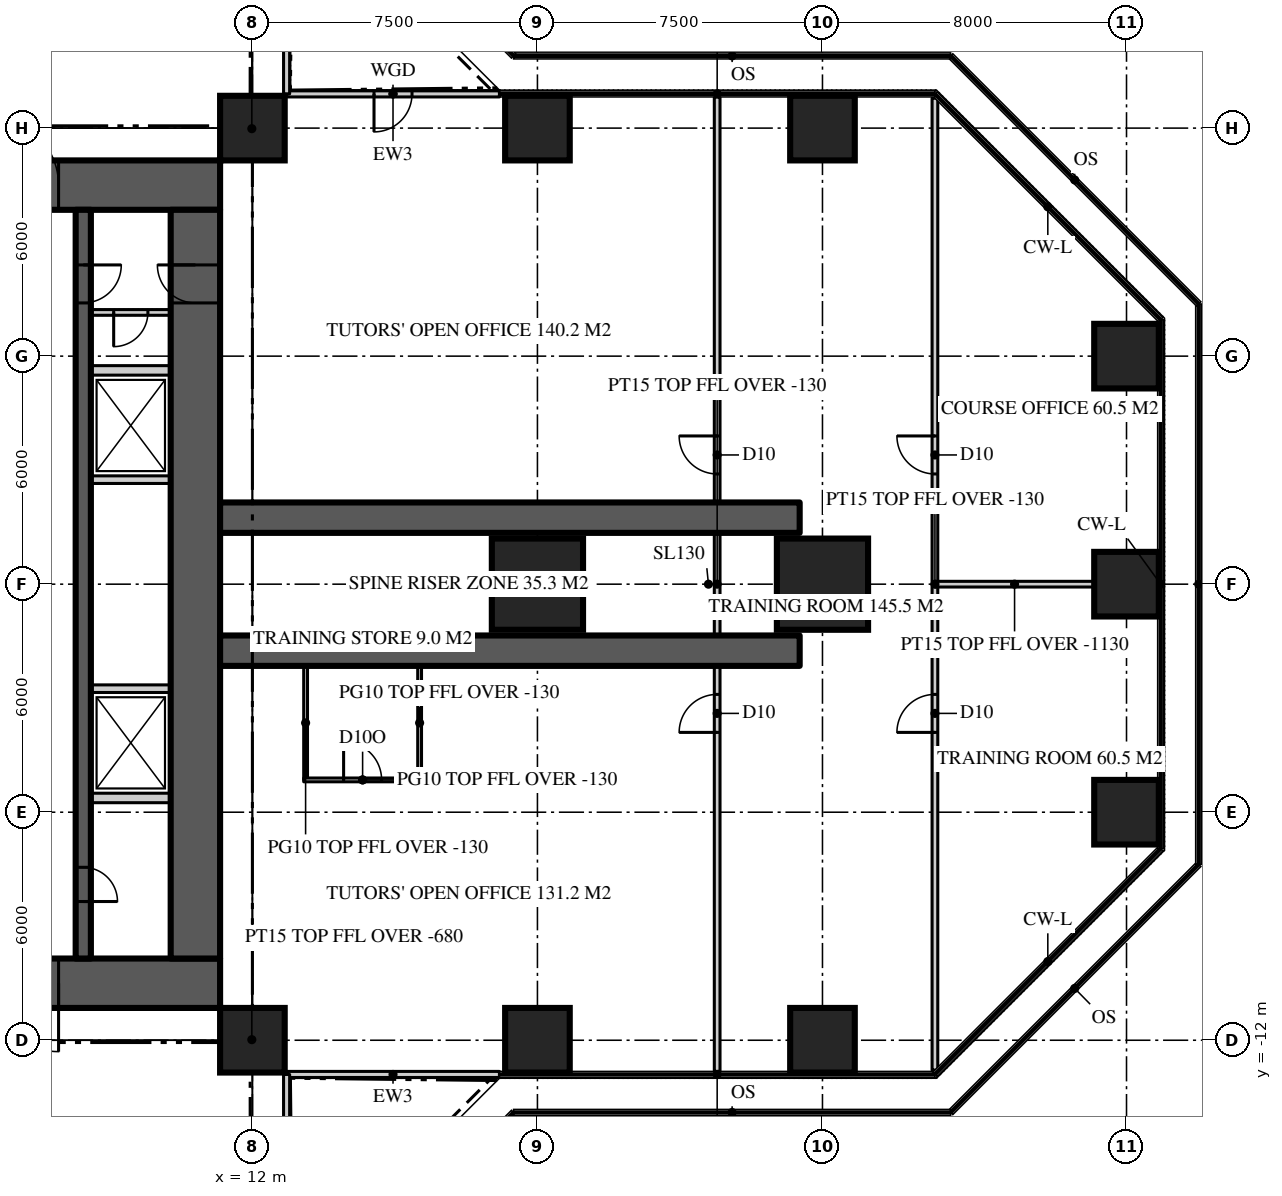
"""IFC4 building model, lengths in metres.
Left out: names, types, materials, properties, quantities, classifications, styles, units other than length and angle.
Written with IfcOpenShell. Run it as: python <this file> out.ifc"""

import sys

from ifc_helpers import new_model, si_unit, direction, frame, frame_2d, origin, origin_2d, place, context, subcontext, project, spatial, rectangle, extrude, element, fill, save


model = new_model("IFC4")
c1 = context("Model", 3, precision=1e-05, world=origin(), true_north=direction((0.0, 1.0)))
c2 = subcontext(c1, "Body", "Model", "MODEL_VIEW")
j1 = project(units=[si_unit("LENGTHUNIT", "METRE"), si_unit("PLANEANGLEUNIT", "RADIAN")], contexts=[c1])
p1 = place(None, origin())
s1 = spatial("IfcSite", under=j1, at=p1, CompositionType="ELEMENT")
p2 = place(p1, origin())
s2 = spatial("IfcBuilding", under=s1, at=p2, CompositionType="ELEMENT")
p3 = place(p2, frame((0.0, 0.0, 102.0)))
s3 = spatial("IfcBuildingStorey", under=s2, at=p3, CompositionType="ELEMENT", Elevation=102.0)
p4 = place(p3, frame((-11.15, 10.5, 0.0), z_axis=(0.0, 0.0, 1.0), x_axis=(1.0, 0.0, 0.0)))
e1 = element("IfcWall", 1, at=p4, inside=s3, PredefinedType="SHEAR", context=c2, shape_type="SweptSolid", body=[
    extrude(rectangle(XDim=22.3, YDim=1.3, at=frame_2d((11.15, 0.0))), origin(), (0.0, 0.0, 1.0), 3.9),
])
p5 = place(p4, frame((4.25, 0.0, 0.0)))
e2 = element("IfcOpeningElement", 2, at=p5, cuts=e1, PredefinedType="OPENING", context=c2, shape_type="SweptSolid", body=[
    extrude(rectangle(XDim=1.8, YDim=2.2, at=frame_2d((0.9, 1.1))), frame((0.0, 0.66, 0.0), z_axis=(0.0, -1.0, 0.0), x_axis=(1.0, 0.0, 0.0)), (0.0, 0.0, 1.0), 1.32),
])
p6 = place(p4, frame((16.25, 0.0, 0.0)))
e3 = element("IfcOpeningElement", 3, at=p6, cuts=e1, PredefinedType="OPENING", context=c2, shape_type="SweptSolid", body=[
    extrude(rectangle(XDim=1.8, YDim=2.2, at=frame_2d((0.9, 1.1))), frame((0.0, 0.66, 0.0), z_axis=(0.0, -1.0, 0.0), x_axis=(1.0, 0.0, 0.0)), (0.0, 0.0, 1.0), 1.32),
])
p7 = place(p3, frame((11.15, -10.5, 0.0), z_axis=(0.0, 0.0, 1.0), x_axis=(-1.0, 0.0, 0.0)))
e4 = element("IfcWall", 4, at=p7, inside=s3, PredefinedType="SHEAR", context=c2, shape_type="SweptSolid", body=[
    extrude(rectangle(XDim=22.3, YDim=1.3, at=frame_2d((11.15, 0.0))), origin(), (0.0, 0.0, 1.0), 3.9),
])
p8 = place(p7, frame((16.25, 0.0, 0.0)))
e5 = element("IfcOpeningElement", 5, at=p8, cuts=e4, PredefinedType="OPENING", context=c2, shape_type="SweptSolid", body=[
    extrude(rectangle(XDim=1.8, YDim=2.2, at=frame_2d((0.9, 1.1))), frame((0.0, 0.66, 0.0), z_axis=(0.0, -1.0, 0.0), x_axis=(1.0, 0.0, 0.0)), (0.0, 0.0, 1.0), 1.32),
])
p9 = place(p7, frame((4.25, 0.0, 0.0)))
e6 = element("IfcOpeningElement", 6, at=p9, cuts=e4, PredefinedType="OPENING", context=c2, shape_type="SweptSolid", body=[
    extrude(rectangle(XDim=1.8, YDim=2.2, at=frame_2d((0.9, 1.1))), frame((0.0, 0.66, 0.0), z_axis=(0.0, -1.0, 0.0), x_axis=(1.0, 0.0, 0.0)), (0.0, 0.0, 1.0), 1.32),
])
p10 = place(p3, frame((10.5, -9.85, 0.0), z_axis=(0.0, 0.0, 1.0), x_axis=(0.0, 1.0, 0.0)))
e7 = element("IfcWall", 7, at=p10, inside=s3, PredefinedType="SHEAR", context=c2, shape_type="SweptSolid", body=[
    extrude(rectangle(XDim=19.7, YDim=1.3, at=frame_2d((9.85, 0.0))), origin(), (0.0, 0.0, 1.0), 3.9),
])
p11 = place(p10, frame((17.25, 0.0, 0.0)))
e8 = element("IfcOpeningElement", 8, at=p11, cuts=e7, PredefinedType="OPENING", context=c2, shape_type="SweptSolid", body=[
    extrude(rectangle(XDim=1.0, YDim=2.2, at=frame_2d((0.5, 1.1))), frame((0.0, 0.66, 0.0), z_axis=(0.0, -1.0, 0.0), x_axis=(1.0, 0.0, 0.0)), (0.0, 0.0, 1.0), 1.32),
])
for number, where, z_axis, x_axis in (
    (9, (11.15, -1.75, 0.0), (0.0, 0.0, 1.0), (1.0, 0.0, 0.0)),
    (10, (11.15, 1.75, 0.0), (0.0, 0.0, 1.0), (1.0, 0.0, 0.0)),
):
    element("IfcWall", number, at=place(p3, frame(where, z_axis=z_axis, x_axis=x_axis)), inside=s3, PredefinedType="SHEAR", context=c2, shape_type="SweptSolid", body=[
        extrude(rectangle(XDim=15.25, YDim=0.8, at=frame_2d((7.625, 0.0))), origin(), (0.0, 0.0, 1.0), 3.9),
    ])
for number, where, z_axis, x_axis in (
    (11, (12.0, -12.0, 0.0), (0.0, 0.0, 1.0), (1.0, 0.0, 0.0)),
    (12, (19.5, -12.0, 0.0), (0.0, 0.0, 1.0), (1.0, 0.0, 0.0)),
    (13, (27.0, -12.0, 0.0), (0.0, 0.0, 1.0), (1.0, 0.0, 0.0)),
    (14, (35.0, -6.0, 0.0), (0.0, 0.0, 1.0), (1.0, 0.0, 0.0)),
):
    element("IfcColumn", number, at=place(p3, frame(where, z_axis=z_axis, x_axis=x_axis)), inside=s3, PredefinedType="COLUMN", context=c2, shape_type="SweptSolid", body=[
        extrude(rectangle(XDim=1.7, YDim=1.7, at=origin_2d()), origin(), (0.0, 0.0, 1.0), 3.9),
    ])
for number, where, z_axis, x_axis in (
    (15, (19.5, 0.0, 0.0), (0.0, 0.0, 1.0), (1.0, 0.0, 0.0)),
    (16, (27.0, 0.0, 0.0), (0.0, 0.0, 1.0), (1.0, 0.0, 0.0)),
):
    element("IfcColumn", number, at=place(p3, frame(where, z_axis=z_axis, x_axis=x_axis)), inside=s3, PredefinedType="COLUMN", context=c2, shape_type="SweptSolid", body=[
        extrude(rectangle(XDim=2.4, YDim=2.4, at=origin_2d()), origin(), (0.0, 0.0, 1.0), 3.9),
    ])
for number, where, z_axis, x_axis in (
    (17, (35.0, 0.0, 0.0), (0.0, 0.0, 1.0), (1.0, 0.0, 0.0)),
    (18, (35.0, 6.0, 0.0), (0.0, 0.0, 1.0), (1.0, 0.0, 0.0)),
    (19, (12.0, 12.0, 0.0), (0.0, 0.0, 1.0), (1.0, 0.0, 0.0)),
    (20, (19.5, 12.0, 0.0), (0.0, 0.0, 1.0), (1.0, 0.0, 0.0)),
    (21, (27.0, 12.0, 0.0), (0.0, 0.0, 1.0), (1.0, 0.0, 0.0)),
):
    element("IfcColumn", number, at=place(p3, frame(where, z_axis=z_axis, x_axis=x_axis)), inside=s3, PredefinedType="COLUMN", context=c2, shape_type="SweptSolid", body=[
        extrude(rectangle(XDim=1.7, YDim=1.7, at=origin_2d()), origin(), (0.0, 0.0, 1.0), 3.9),
    ])
p12 = place(p3, frame((12.9, -12.9, 0.0), z_axis=(0.0, 0.0, 1.0), x_axis=(1.0, 0.0, 0.0)))
e22 = element("IfcWall", 22, at=p12, inside=s3, PredefinedType="SOLIDWALL", context=c2, shape_type="SweptSolid", body=[
    extrude(rectangle(XDim=5.6, YDim=0.16, at=frame_2d((2.8, 0.0))), origin(), (0.0, 0.0, 1.0), 3.77),
])
p13 = place(p3, frame((18.5, 12.9, 0.0), z_axis=(0.0, 0.0, 1.0), x_axis=(-1.0, 0.0, 0.0)))
e23 = element("IfcWall", 23, at=p13, inside=s3, PredefinedType="SOLIDWALL", context=c2, shape_type="SweptSolid", body=[
    extrude(rectangle(XDim=5.6, YDim=0.16, at=frame_2d((2.8, 0.0))), origin(), (0.0, 0.0, 1.0), 3.77),
])
p14 = place(p13, frame((2.3, 0.0, 0.0)))
e24 = element("IfcOpeningElement", 24, at=p14, cuts=e23, PredefinedType="OPENING", context=c2, shape_type="SweptSolid", body=[
    extrude(rectangle(XDim=1.0, YDim=2.2, at=frame_2d((0.5, 1.1))), frame((0.0, 0.09, 0.0), z_axis=(0.0, -1.0, 0.0), x_axis=(1.0, 0.0, 0.0)), (0.0, 0.0, 1.0), 0.18),
])
p15 = place(p3, frame((12.9, 12.9, 0.0), z_axis=(0.0, 0.0, 1.0), x_axis=(0.0, 1.0, 0.0)))
e25 = element("IfcWall", 25, at=p15, inside=s3, PredefinedType="SOLIDWALL", context=c2, shape_type="SweptSolid", body=[
    extrude(rectangle(XDim=5.6, YDim=0.16, at=frame_2d((2.8, 0.0))), origin(), (0.0, 0.0, 1.0), 3.77),
])
p16 = place(p3, frame((12.9, -18.5, 0.0), z_axis=(0.0, 0.0, 1.0), x_axis=(0.0, 1.0, 0.0)))
e26 = element("IfcWall", 26, at=p16, inside=s3, PredefinedType="SOLIDWALL", context=c2, shape_type="SweptSolid", body=[
    extrude(rectangle(XDim=5.6, YDim=0.16, at=frame_2d((2.8, 0.0))), origin(), (0.0, 0.0, 1.0), 3.77),
])
p17 = place(p16, frame((2.3, 0.0, 0.0)))
e27 = element("IfcOpeningElement", 27, at=p17, cuts=e26, PredefinedType="OPENING", context=c2, shape_type="SweptSolid", body=[
    extrude(rectangle(XDim=1.0, YDim=2.2, at=frame_2d((0.5, 1.1))), frame((0.0, 0.09, 0.0), z_axis=(0.0, -1.0, 0.0), x_axis=(1.0, 0.0, 0.0)), (0.0, 0.0, 1.0), 0.18),
])
p18 = place(p3, frame((7.55, 9.85, 0.0), z_axis=(0.0, 0.0, 1.0), x_axis=(0.0, -1.0, 0.0)))
e28 = element("IfcWall", 28, at=p18, inside=s3, PredefinedType="SHEAR", context=c2, shape_type="SweptSolid", body=[
    extrude(rectangle(XDim=19.7, YDim=0.4, at=frame_2d((9.85, 0.0))), origin(), (0.0, 0.0, 1.0), 3.9),
])
p19 = place(p18, frame((1.45, 0.0, 0.0)))
e29 = element("IfcOpeningElement", 29, at=p19, cuts=e28, PredefinedType="OPENING", context=c2, shape_type="SweptSolid", body=[
    extrude(rectangle(XDim=1.0, YDim=2.2, at=frame_2d((0.5, 1.1))), frame((0.0, 0.21, 0.0), z_axis=(0.0, -1.0, 0.0), x_axis=(1.0, 0.0, 0.0)), (0.0, 0.0, 1.0), 0.42),
])
p20 = place(p18, frame((17.3, 0.0, 0.0)))
e30 = element("IfcOpeningElement", 30, at=p20, cuts=e28, PredefinedType="OPENING", context=c2, shape_type="SweptSolid", body=[
    extrude(rectangle(XDim=0.9, YDim=2.1, at=frame_2d((0.45, 1.05))), frame((0.0, 0.21, 0.0), z_axis=(0.0, -1.0, 0.0), x_axis=(1.0, 0.0, 0.0)), (0.0, 0.0, 1.0), 0.42),
])
for number, where, z_axis, x_axis in (
    (31, (7.75, 5.625, 0.0), (0.0, 0.0, 1.0), (1.0, 0.0, 0.0)),
    (32, (7.75, -5.625, 0.0), (0.0, 0.0, 1.0), (1.0, 0.0, 0.0)),
):
    element("IfcWall", number, at=place(p3, frame(where, z_axis=z_axis, x_axis=x_axis)), inside=s3, PredefinedType="SOLIDWALL", context=c2, shape_type="SweptSolid", body=[
        extrude(rectangle(XDim=2.1, YDim=0.25, at=frame_2d((1.05, 0.0))), origin(), (0.0, 0.0, 1.0), 3.7),
    ])
for number, where, z_axis, x_axis in (
    (33, (7.75, -2.75, 0.0), (0.0, 0.0, 1.0), (1.0, 0.0, 0.0)),
    (34, (7.75, 2.75, 0.0), (0.0, 0.0, 1.0), (1.0, 0.0, 0.0)),
):
    element("IfcWall", number, at=place(p3, frame(where, z_axis=z_axis, x_axis=x_axis)), inside=s3, PredefinedType="SOLIDWALL", context=c2, shape_type="SweptSolid", body=[
        extrude(rectangle(XDim=2.1, YDim=0.2, at=frame_2d((1.05, 0.0))), origin(), (0.0, 0.0, 1.0), 3.7),
    ])
p21 = place(p3, frame((24.229, -12.82, 0.0), z_axis=(0.0, 0.0, 1.0), x_axis=(0.0, 1.0, 0.0)))
e35 = element("IfcWall", 35, at=p21, inside=s3, PredefinedType="PARTITIONING", context=c2, shape_type="SweptSolid", body=[
    extrude(rectangle(XDim=25.64, YDim=0.15, at=frame_2d((12.82, 0.0))), origin(), (0.0, 0.0, 1.0), 3.77),
])
p22 = place(p21, frame((15.72, 0.0, 0.0)))
e36 = element("IfcOpeningElement", 36, at=p22, cuts=e35, PredefinedType="OPENING", context=c2, shape_type="SweptSolid", body=[
    extrude(rectangle(XDim=1.0, YDim=2.2, at=frame_2d((0.5, 1.1))), frame((0.0, 0.085, 0.0), z_axis=(0.0, -1.0, 0.0), x_axis=(1.0, 0.0, 0.0)), (0.0, 0.0, 1.0), 0.17),
])
p23 = place(p21, frame((8.92, 0.0, 0.0)))
e37 = element("IfcOpeningElement", 37, at=p23, cuts=e35, PredefinedType="OPENING", context=c2, shape_type="SweptSolid", body=[
    extrude(rectangle(XDim=1.0, YDim=2.2, at=frame_2d((0.5, 1.1))), frame((0.0, 0.085, 0.0), z_axis=(0.0, -1.0, 0.0), x_axis=(1.0, 0.0, 0.0)), (0.0, 0.0, 1.0), 0.17),
])
p24 = place(p3, frame((29.959, -12.786, 0.0), z_axis=(0.0, 0.0, 1.0), x_axis=(0.0, 1.0, 0.0)))
e38 = element("IfcWall", 38, at=p24, inside=s3, PredefinedType="PARTITIONING", context=c2, shape_type="SweptSolid", body=[
    extrude(rectangle(XDim=25.573, YDim=0.15, at=frame_2d((12.786, 0.0))), origin(), (0.0, 0.0, 1.0), 3.77),
])
p25 = place(p24, frame((15.687, 0.0, 0.0)))
e39 = element("IfcOpeningElement", 39, at=p25, cuts=e38, PredefinedType="OPENING", context=c2, shape_type="SweptSolid", body=[
    extrude(rectangle(XDim=1.0, YDim=2.2, at=frame_2d((0.5, 1.1))), frame((0.0, 0.085, 0.0), z_axis=(0.0, -1.0, 0.0), x_axis=(1.0, 0.0, 0.0)), (0.0, 0.0, 1.0), 0.17),
])
p26 = place(p24, frame((8.886, 0.0, 0.0)))
e40 = element("IfcOpeningElement", 40, at=p26, cuts=e38, PredefinedType="OPENING", context=c2, shape_type="SweptSolid", body=[
    extrude(rectangle(XDim=1.0, YDim=2.2, at=frame_2d((0.5, 1.1))), frame((0.0, 0.085, 0.0), z_axis=(0.0, -1.0, 0.0), x_axis=(1.0, 0.0, 0.0)), (0.0, 0.0, 1.0), 0.17),
])
p27 = place(p3, frame((29.959, 0.0, 0.0), z_axis=(0.0, 0.0, 1.0), x_axis=(1.0, 0.0, 0.0)))
e41 = element("IfcWall", 41, at=p27, inside=s3, PredefinedType="PARTITIONING", context=c2, shape_type="SweptSolid", body=[
    extrude(rectangle(XDim=4.191, YDim=0.15, at=frame_2d((2.095, 0.0))), origin(), (0.0, 0.0, 1.0), 2.77),
])
for number, where, z_axis, x_axis in (
    (42, (13.4, -2.15, 0.0), (0.0, 0.0, 1.0), (0.0, -1.0, 0.0)),
    (43, (16.4, -2.15, 0.0), (0.0, 0.0, 1.0), (0.0, -1.0, 0.0)),
):
    element("IfcWall", number, at=place(p3, frame(where, z_axis=z_axis, x_axis=x_axis)), inside=s3, PredefinedType="PARTITIONING", context=c2, shape_type="SweptSolid", body=[
        extrude(rectangle(XDim=3.0, YDim=0.1, at=frame_2d((1.5, 0.0))), origin(), (0.0, 0.0, 1.0), 3.77),
    ])
p28 = place(p3, frame((13.35, -5.15, 0.0), z_axis=(0.0, 0.0, 1.0), x_axis=(1.0, 0.0, 0.0)))
e44 = element("IfcWall", 44, at=p28, inside=s3, PredefinedType="PARTITIONING", context=c2, shape_type="SweptSolid", body=[
    extrude(rectangle(XDim=3.1, YDim=0.1, at=frame_2d((1.55, 0.0))), origin(), (0.0, 0.0, 1.0), 3.77),
])
p29 = place(p28, frame((1.05, 0.0, 0.0)))
e45 = element("IfcOpeningElement", 45, at=p29, cuts=e44, PredefinedType="OPENING", context=c2, shape_type="SweptSolid", body=[
    extrude(rectangle(XDim=1.0, YDim=2.2, at=frame_2d((0.5, 1.1))), frame((0.0, 0.06, 0.0), z_axis=(0.0, -1.0, 0.0), x_axis=(1.0, 0.0, 0.0)), (0.0, 0.0, 1.0), 0.12),
])
for number, where, z_axis, x_axis in (
    (46, (11.15, 11.15, 0.0), (0.0, 0.0, 1.0), (0.707, 0.707, 0.0)),
    (47, (11.15, -11.15, 0.0), (0.0, 0.0, 1.0), (0.707, -0.707, 0.0)),
):
    element("IfcWall", number, at=place(p3, frame(where, z_axis=z_axis, x_axis=x_axis)), inside=s3, PredefinedType="PARTITIONING", context=c2, shape_type="SweptSolid", body=[
        extrude(rectangle(XDim=2.362, YDim=0.15, at=frame_2d((1.181, 0.0))), origin(), (0.0, 0.0, 1.0), 3.22),
    ])
p30 = place(p3, frame((9.85, 7.15, 0.0), z_axis=(0.0, 0.0, 1.0), x_axis=(-1.0, 0.0, 0.0)))
e48 = element("IfcWall", 48, at=p30, inside=s3, PredefinedType="SOLIDWALL", context=c2, shape_type="SweptSolid", body=[
    extrude(rectangle(XDim=2.1, YDim=0.15, at=frame_2d((1.05, 0.0))), origin(), (0.0, 0.0, 1.0), 3.77),
])
p31 = place(p30, frame((0.6, 0.0, 0.0)))
e49 = element("IfcOpeningElement", 49, at=p31, cuts=e48, PredefinedType="OPENING", context=c2, shape_type="SweptSolid", body=[
    extrude(rectangle(XDim=0.9, YDim=2.1, at=frame_2d((0.45, 1.05))), frame((0.0, 0.085, 0.0), z_axis=(0.0, -1.0, 0.0), x_axis=(1.0, 0.0, 0.0)), (0.0, 0.0, 1.0), 0.17),
])
p32 = place(p14, origin())
e50 = element("IfcDoor", 50, at=p32, inside=s3, OperationType="SINGLE_SWING_RIGHT", PredefinedType="DOOR", context=c2, shape_type="SweptSolid", body=[
    extrude(rectangle(XDim=1.0, YDim=2.2, at=frame_2d((0.5, 1.1))), frame((0.0, 0.025, 0.0), z_axis=(0.0, -1.0, 0.0), x_axis=(1.0, 0.0, 0.0)), (0.0, 0.0, 1.0), 0.05),
])
fill(e24, e50)
p33 = place(p6, origin())
e51 = element("IfcDoor", 51, at=p33, inside=s3, OperationType="DOUBLE_DOOR_DOUBLE_SWING", PredefinedType="DOOR", context=c2, shape_type="SweptSolid", body=[
    extrude(rectangle(XDim=1.8, YDim=2.2, at=frame_2d((0.9, 1.1))), frame((0.0, 0.025, 0.0), z_axis=(0.0, -1.0, 0.0), x_axis=(1.0, 0.0, 0.0)), (0.0, 0.0, 1.0), 0.05),
])
fill(e3, e51)
p34 = place(p9, origin())
e52 = element("IfcDoor", 52, at=p34, inside=s3, OperationType="DOUBLE_DOOR_DOUBLE_SWING", PredefinedType="DOOR", context=c2, shape_type="SweptSolid", body=[
    extrude(rectangle(XDim=1.8, YDim=2.2, at=frame_2d((0.9, 1.1))), frame((0.0, 0.025, 0.0), z_axis=(0.0, -1.0, 0.0), x_axis=(1.0, 0.0, 0.0)), (0.0, 0.0, 1.0), 0.05),
])
fill(e6, e52)
p35 = place(p19, origin())
e53 = element("IfcDoor", 53, at=p35, inside=s3, OperationType="SINGLE_SWING_LEFT", PredefinedType="DOOR", context=c2, shape_type="SweptSolid", body=[
    extrude(rectangle(XDim=1.0, YDim=2.2, at=frame_2d((0.5, 1.1))), frame((0.0, 0.025, 0.0), z_axis=(0.0, -1.0, 0.0), x_axis=(1.0, 0.0, 0.0)), (0.0, 0.0, 1.0), 0.05),
])
fill(e29, e53)
p36 = place(p11, origin())
e54 = element("IfcDoor", 54, at=p36, inside=s3, OperationType="SINGLE_SWING_RIGHT", PredefinedType="DOOR", context=c2, shape_type="SweptSolid", body=[
    extrude(rectangle(XDim=1.0, YDim=2.2, at=frame_2d((0.5, 1.1))), frame((0.0, 0.025, 0.0), z_axis=(0.0, -1.0, 0.0), x_axis=(1.0, 0.0, 0.0)), (0.0, 0.0, 1.0), 0.05),
])
fill(e8, e54)
p37 = place(p20, origin())
e55 = element("IfcDoor", 55, at=p37, inside=s3, OperationType="SINGLE_SWING_RIGHT", PredefinedType="DOOR", context=c2, shape_type="SweptSolid", body=[
    extrude(rectangle(XDim=0.9, YDim=2.1, at=frame_2d((0.45, 1.05))), frame((0.0, 0.025, 0.0), z_axis=(0.0, -1.0, 0.0), x_axis=(1.0, 0.0, 0.0)), (0.0, 0.0, 1.0), 0.05),
])
fill(e30, e55)
p38 = place(p22, origin())
e56 = element("IfcDoor", 56, at=p38, inside=s3, OperationType="SINGLE_SWING_RIGHT", PredefinedType="DOOR", context=c2, shape_type="SweptSolid", body=[
    extrude(rectangle(XDim=1.0, YDim=2.2, at=frame_2d((0.5, 1.1))), frame((0.0, 0.025, 0.0), z_axis=(0.0, -1.0, 0.0), x_axis=(1.0, 0.0, 0.0)), (0.0, 0.0, 1.0), 0.05),
])
fill(e36, e56)
p39 = place(p23, origin())
e57 = element("IfcDoor", 57, at=p39, inside=s3, OperationType="SINGLE_SWING_LEFT", PredefinedType="DOOR", context=c2, shape_type="SweptSolid", body=[
    extrude(rectangle(XDim=1.0, YDim=2.2, at=frame_2d((0.5, 1.1))), frame((0.0, 0.025, 0.0), z_axis=(0.0, -1.0, 0.0), x_axis=(1.0, 0.0, 0.0)), (0.0, 0.0, 1.0), 0.05),
])
fill(e37, e57)
p40 = place(p25, origin())
e58 = element("IfcDoor", 58, at=p40, inside=s3, OperationType="SINGLE_SWING_RIGHT", PredefinedType="DOOR", context=c2, shape_type="SweptSolid", body=[
    extrude(rectangle(XDim=1.0, YDim=2.2, at=frame_2d((0.5, 1.1))), frame((0.0, 0.025, 0.0), z_axis=(0.0, -1.0, 0.0), x_axis=(1.0, 0.0, 0.0)), (0.0, 0.0, 1.0), 0.05),
])
fill(e39, e58)
p41 = place(p26, origin())
e59 = element("IfcDoor", 59, at=p41, inside=s3, OperationType="SINGLE_SWING_LEFT", PredefinedType="DOOR", context=c2, shape_type="SweptSolid", body=[
    extrude(rectangle(XDim=1.0, YDim=2.2, at=frame_2d((0.5, 1.1))), frame((0.0, 0.025, 0.0), z_axis=(0.0, -1.0, 0.0), x_axis=(1.0, 0.0, 0.0)), (0.0, 0.0, 1.0), 0.05),
])
fill(e40, e59)
p42 = place(p29, origin())
e60 = element("IfcDoor", 60, at=p42, inside=s3, OperationType="SINGLE_SWING_LEFT", PredefinedType="DOOR", context=c2, shape_type="SweptSolid", body=[
    extrude(rectangle(XDim=1.0, YDim=2.2, at=frame_2d((0.5, 1.1))), frame((0.0, 0.025, 0.0), z_axis=(0.0, -1.0, 0.0), x_axis=(1.0, 0.0, 0.0)), (0.0, 0.0, 1.0), 0.05),
])
fill(e45, e60)
p43 = place(p31, origin())
e61 = element("IfcDoor", 61, at=p43, inside=s3, OperationType="SINGLE_SWING_RIGHT", PredefinedType="DOOR", context=c2, shape_type="SweptSolid", body=[
    extrude(rectangle(XDim=0.9, YDim=2.1, at=frame_2d((0.45, 1.05))), frame((0.0, 0.025, 0.0), z_axis=(0.0, -1.0, 0.0), x_axis=(1.0, 0.0, 0.0)), (0.0, 0.0, 1.0), 0.05),
])
fill(e49, e61)
save(model, sys.argv[1])
